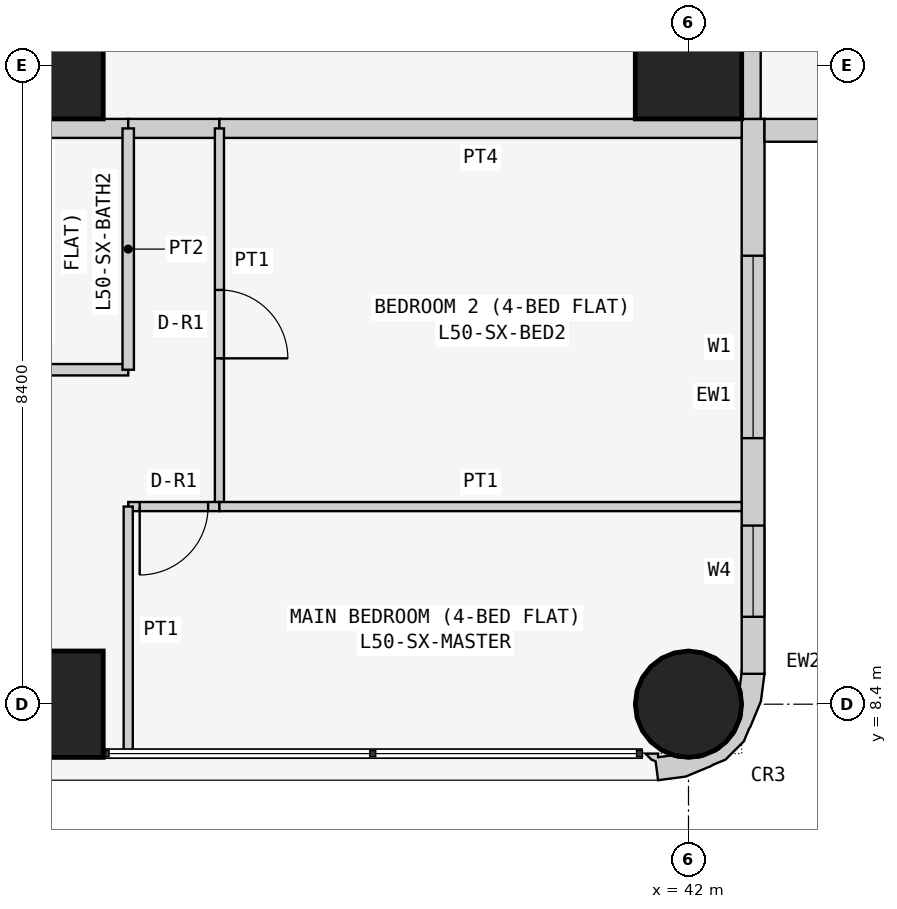
"""IFC4 building model, lengths in metres.
Left out: names, types, materials, properties, quantities, classifications, styles, units other than length and angle.
Written with IfcOpenShell. Run it as: python <this file> out.ifc"""

import sys

from ifc_helpers import new_model, si_unit, direction, frame, frame_2d, origin, origin_2d, place, context, subcontext, project, spatial, polyline, rectangle, circle, outline, extrude, element, fill, save


model = new_model("IFC4")
c1 = context("Model", 3, precision=1e-05, world=origin(), true_north=direction((0.0, 1.0)))
c2 = subcontext(c1, "Body", "Model", "MODEL_VIEW")
j1 = project(units=[si_unit("LENGTHUNIT", "METRE"), si_unit("PLANEANGLEUNIT", "RADIAN")], contexts=[c1])
p1 = place(None, origin())
s1 = spatial("IfcSite", under=j1, at=p1, CompositionType="ELEMENT")
p2 = place(p1, origin())
s2 = spatial("IfcBuilding", under=s1, at=p2, CompositionType="ELEMENT")
p3 = place(p2, frame((0.0, 0.0, 194.1)))
s3 = spatial("IfcBuildingStorey", under=s2, at=p3, CompositionType="ELEMENT", Elevation=194.1)
for number, where, z_axis, x_axis in (
    (1, (33.6, 8.4, 0.0), (0.0, 0.0, 1.0), (1.0, 0.0, 0.0)),
    (2, (33.6, 16.8, 0.0), (0.0, 0.0, 1.0), (1.0, 0.0, 0.0)),
):
    element("IfcColumn", number, at=place(p3, frame(where, z_axis=z_axis, x_axis=x_axis)), inside=s3, PredefinedType="COLUMN", context=c2, shape_type="SweptSolid", body=[
        extrude(rectangle(XDim=1.4, YDim=1.4, at=origin_2d()), origin(), (0.0, 0.0, 1.0), 3.6),
    ])
p4 = place(p3, frame((42.0, 8.4, 0.0), z_axis=(0.0, 0.0, 1.0), x_axis=(1.0, 0.0, 0.0)))
e3 = element("IfcColumn", 3, at=p4, inside=s3, PredefinedType="COLUMN", context=c2, shape_type="SweptSolid", body=[
    extrude(circle(Radius=0.7, at=origin_2d()), origin(), (0.0, 0.0, 1.0), 3.6),
])
p5 = place(p3, frame((42.0, 16.8, 0.0), z_axis=(0.0, 0.0, 1.0), x_axis=(1.0, 0.0, 0.0)))
e4 = element("IfcColumn", 4, at=p5, inside=s3, PredefinedType="COLUMN", context=c2, shape_type="SweptSolid", body=[
    extrude(rectangle(XDim=1.4, YDim=1.4, at=origin_2d()), origin(), (0.0, 0.0, 1.0), 3.6),
])
p6 = place(p3, frame((42.85, 8.8, 0.0), z_axis=(0.0, 0.0, 1.0), x_axis=(0.0, 1.0, 0.0)))
e5 = element("IfcWall", 5, at=p6, inside=s3, PredefinedType="SOLIDWALL", context=c2, shape_type="SweptSolid", body=[
    extrude(rectangle(XDim=7.3, YDim=0.3, at=frame_2d((3.65, 0.0))), origin(), (0.0, 0.0, 1.0), 3.45),
])
p7 = place(p6, frame((3.1, 0.0, 0.9)))
e6 = element("IfcOpeningElement", 6, at=p7, cuts=e5, PredefinedType="OPENING", context=c2, shape_type="SweptSolid", body=[
    extrude(rectangle(XDim=2.4, YDim=1.5, at=frame_2d((1.2, 0.75))), frame((0.0, 0.16, 0.0), z_axis=(0.0, -1.0, 0.0), x_axis=(1.0, 0.0, 0.0)), (0.0, 0.0, 1.0), 0.32),
])
p8 = place(p6, frame((0.75, 0.0, 0.9)))
e7 = element("IfcOpeningElement", 7, at=p8, cuts=e5, PredefinedType="OPENING", context=c2, shape_type="SweptSolid", body=[
    extrude(rectangle(XDim=1.2, YDim=1.5, at=frame_2d((0.6, 0.75))), frame((0.0, 0.16, 0.0), z_axis=(0.0, -1.0, 0.0), x_axis=(1.0, 0.0, 0.0)), (0.0, 0.0, 1.0), 0.32),
])
p9 = place(p3, frame((43.0, 15.95, 0.0), z_axis=(0.0, 0.0, 1.0), x_axis=(1.0, 0.0, 0.0)))
e8 = element("IfcWall", 8, at=p9, inside=s3, PredefinedType="SOLIDWALL", context=c2, shape_type="SweptSolid", body=[
    extrude(rectangle(XDim=7.0, YDim=0.3, at=frame_2d((3.5, 0.0))), origin(), (0.0, 0.0, 1.0), 3.45),
])
p10 = place(p9, frame((1.5, 0.0, 0.9)))
e9 = element("IfcOpeningElement", 9, at=p10, cuts=e8, PredefinedType="OPENING", context=c2, shape_type="SweptSolid", body=[
    extrude(rectangle(XDim=2.4, YDim=1.5, at=frame_2d((1.2, 0.75))), frame((0.0, 0.16, 0.0), z_axis=(0.0, -1.0, 0.0), x_axis=(1.0, 0.0, 0.0)), (0.0, 0.0, 1.0), 0.32),
])
p11 = place(p9, frame((5.05, 0.0, 0.9)))
e10 = element("IfcOpeningElement", 10, at=p11, cuts=e8, PredefinedType="OPENING", context=c2, shape_type="SweptSolid", body=[
    extrude(rectangle(XDim=1.2, YDim=1.5, at=frame_2d((0.6, 0.75))), frame((0.0, 0.16, 0.0), z_axis=(0.0, -1.0, 0.0), x_axis=(1.0, 0.0, 0.0)), (0.0, 0.0, 1.0), 0.32),
])
p12 = place(p3, frame((41.488, 7.812, 0.0), z_axis=(0.0, 0.0, 1.0), x_axis=(0.439933741929, -0.898030234854, 0.0)))
e11 = element("IfcWall", 11, at=p12, inside=s3, PredefinedType="SOLIDWALL", context=c2, shape_type="SweptSolid", body=[
    extrude(outline(polyline([(-0.222, 1.793), (-0.39, 1.541), (-0.372, 1.532), (-0.195, 1.414), (-0.12, 1.41), (0.131, 1.287), (0.315, 1.078), (0.406, 0.814), (0.388, 0.536), (0.265, 0.285), (0.209, 0.235), (0.148, 0.053), (0.105, 0.074), (0.032, -0.076), (0.138, -0.04), (0.182, -0.0), (0.419, -0.08), (0.536, 0.266), (0.559, 0.631), (0.555, 0.651), (0.566, 0.836), (0.455, 1.159), (0.333, 1.298), (0.324, 1.317), (0.082, 1.591), (-0.222, 1.793)])), origin(), (0.0, 0.0, 1.0), 3.45),
])
p13 = place(p3, frame((42.825, 22.971, 0.0), z_axis=(0.0, 0.0, 1.0), x_axis=(0.0, -1.0, 0.0)))
e12 = element("IfcWall", 12, at=p13, inside=s3, PredefinedType="PARTITIONING", context=c2, shape_type="SweptSolid", body=[
    extrude(rectangle(XDim=6.871, YDim=0.25, at=frame_2d((3.436, 0.0))), origin(), (0.0, 0.0, 1.0), 3.45),
])
p14 = place(p3, frame((34.629, 15.975, 0.0), z_axis=(0.0, 0.0, 1.0), x_axis=(-1.0, 0.0, 0.0)))
e13 = element("IfcWall", 13, at=p14, inside=s3, PredefinedType="PARTITIONING", context=c2, shape_type="SweptSolid", body=[
    extrude(rectangle(XDim=2.629, YDim=0.25, at=frame_2d((1.314, 0.0))), origin(), (0.0, 0.0, 1.0), 3.45),
])
p15 = place(p3, frame((35.829, 15.975, 0.0), z_axis=(0.0, 0.0, 1.0), x_axis=(-1.0, 0.0, 0.0)))
e14 = element("IfcWall", 14, at=p15, inside=s3, PredefinedType="PARTITIONING", context=c2, shape_type="SweptSolid", body=[
    extrude(rectangle(XDim=1.2, YDim=0.25, at=frame_2d((0.6, 0.0))), origin(), (0.0, 0.0, 1.0), 3.45),
])
p16 = place(p3, frame((42.7, 15.975, 0.0), z_axis=(0.0, 0.0, 1.0), x_axis=(-1.0, 0.0, 0.0)))
e15 = element("IfcWall", 15, at=p16, inside=s3, PredefinedType="PARTITIONING", context=c2, shape_type="SweptSolid", body=[
    extrude(rectangle(XDim=6.871, YDim=0.25, at=frame_2d((3.436, 0.0))), origin(), (0.0, 0.0, 1.0), 3.45),
])
p17 = place(p3, frame((32.0, 12.8, 0.0), z_axis=(0.0, 0.0, 1.0), x_axis=(1.0, 0.0, 0.0)))
e16 = element("IfcWall", 16, at=p17, inside=s3, PredefinedType="PARTITIONING", context=c2, shape_type="SweptSolid", body=[
    extrude(rectangle(XDim=2.629, YDim=0.15, at=frame_2d((1.314, 0.0))), origin(), (0.0, 0.0, 1.0), 3.45),
])
p18 = place(p3, frame((34.629, 12.8, 0.0), z_axis=(0.0, 0.0, 1.0), x_axis=(0.0, 1.0, 0.0)))
e17 = element("IfcWall", 17, at=p18, inside=s3, PredefinedType="PARTITIONING", context=c2, shape_type="SweptSolid", body=[
    extrude(rectangle(XDim=3.175, YDim=0.15, at=frame_2d((1.587, 0.0))), origin(), (0.0, 0.0, 1.0), 3.45),
])
p19 = place(p3, frame((35.829, 15.975, 0.0), z_axis=(0.0, 0.0, 1.0), x_axis=(0.0, -1.0, 0.0)))
e18 = element("IfcWall", 18, at=p19, inside=s3, PredefinedType="PARTITIONING", context=c2, shape_type="SweptSolid", body=[
    extrude(rectangle(XDim=4.975, YDim=0.12, at=frame_2d((2.488, 0.0))), origin(), (0.0, 0.0, 1.0), 3.45),
])
p20 = place(p19, frame((2.125, 0.0, 0.0)))
e19 = element("IfcOpeningElement", 19, at=p20, cuts=e18, PredefinedType="OPENING", context=c2, shape_type="SweptSolid", body=[
    extrude(rectangle(XDim=0.9, YDim=2.1, at=frame_2d((0.45, 1.05))), frame((0.0, 0.07, 0.0), z_axis=(0.0, -1.0, 0.0), x_axis=(1.0, 0.0, 0.0)), (0.0, 0.0, 1.0), 0.14),
])
p21 = place(p3, frame((35.829, 11.0, 0.0), z_axis=(0.0, 0.0, 1.0), x_axis=(-1.0, 0.0, 0.0)))
e20 = element("IfcWall", 20, at=p21, inside=s3, PredefinedType="PARTITIONING", context=c2, shape_type="SweptSolid", body=[
    extrude(rectangle(XDim=1.2, YDim=0.12, at=frame_2d((0.6, 0.0))), origin(), (0.0, 0.0, 1.0), 3.45),
])
p22 = place(p21, frame((0.149, 0.0, 0.0)))
e21 = element("IfcOpeningElement", 21, at=p22, cuts=e20, PredefinedType="OPENING", context=c2, shape_type="SweptSolid", body=[
    extrude(rectangle(XDim=0.9, YDim=2.1, at=frame_2d((0.45, 1.05))), frame((0.0, 0.07, 0.0), z_axis=(0.0, -1.0, 0.0), x_axis=(1.0, 0.0, 0.0)), (0.0, 0.0, 1.0), 0.14),
])
p23 = place(p3, frame((34.629, 11.0, 0.0), z_axis=(0.0, 0.0, 1.0), x_axis=(0.0, -1.0, 0.0)))
e22 = element("IfcWall", 22, at=p23, inside=s3, PredefinedType="PARTITIONING", context=c2, shape_type="SweptSolid", body=[
    extrude(rectangle(XDim=3.25, YDim=0.12, at=frame_2d((1.625, 0.0))), origin(), (0.0, 0.0, 1.0), 3.45),
])
p24 = place(p3, frame((35.829, 11.0, 0.0), z_axis=(0.0, 0.0, 1.0), x_axis=(1.0, 0.0, 0.0)))
e23 = element("IfcWall", 23, at=p24, inside=s3, PredefinedType="PARTITIONING", context=c2, shape_type="SweptSolid", body=[
    extrude(rectangle(XDim=6.871, YDim=0.12, at=frame_2d((3.436, 0.0))), origin(), (0.0, 0.0, 1.0), 3.45),
])
p25 = place(p7, origin())
e24 = element("IfcWindow", 24, at=p25, inside=s3, PartitioningType="SINGLE_PANEL", PredefinedType="WINDOW", context=c2, shape_type="SweptSolid", body=[
    extrude(rectangle(XDim=2.4, YDim=1.5, at=frame_2d((1.2, 0.75))), frame((0.0, 0.03, 0.0), z_axis=(0.0, -1.0, 0.0), x_axis=(1.0, 0.0, 0.0)), (0.0, 0.0, 1.0), 0.06),
])
fill(e6, e24)
p26 = place(p8, origin())
e25 = element("IfcWindow", 25, at=p26, inside=s3, PartitioningType="SINGLE_PANEL", PredefinedType="WINDOW", context=c2, shape_type="SweptSolid", body=[
    extrude(rectangle(XDim=1.2, YDim=1.5, at=frame_2d((0.6, 0.75))), frame((0.0, 0.03, 0.0), z_axis=(0.0, -1.0, 0.0), x_axis=(1.0, 0.0, 0.0)), (0.0, 0.0, 1.0), 0.06),
])
fill(e7, e25)
p27 = place(p20, origin())
e26 = element("IfcDoor", 26, at=p27, inside=s3, OperationType="SINGLE_SWING_RIGHT", PredefinedType="DOOR", context=c2, shape_type="SweptSolid", body=[
    extrude(rectangle(XDim=0.9, YDim=2.1, at=frame_2d((0.45, 1.05))), frame((0.0, 0.025, 0.0), z_axis=(0.0, -1.0, 0.0), x_axis=(1.0, 0.0, 0.0)), (0.0, 0.0, 1.0), 0.05),
])
fill(e19, e26)
p28 = place(p22, origin())
e27 = element("IfcDoor", 27, at=p28, inside=s3, OperationType="SINGLE_SWING_RIGHT", PredefinedType="DOOR", context=c2, shape_type="SweptSolid", body=[
    extrude(rectangle(XDim=0.9, YDim=2.1, at=frame_2d((0.45, 1.05))), frame((0.0, 0.025, 0.0), z_axis=(0.0, -1.0, 0.0), x_axis=(1.0, 0.0, 0.0)), (0.0, 0.0, 1.0), 0.05),
])
fill(e21, e27)
save(model, sys.argv[1])
